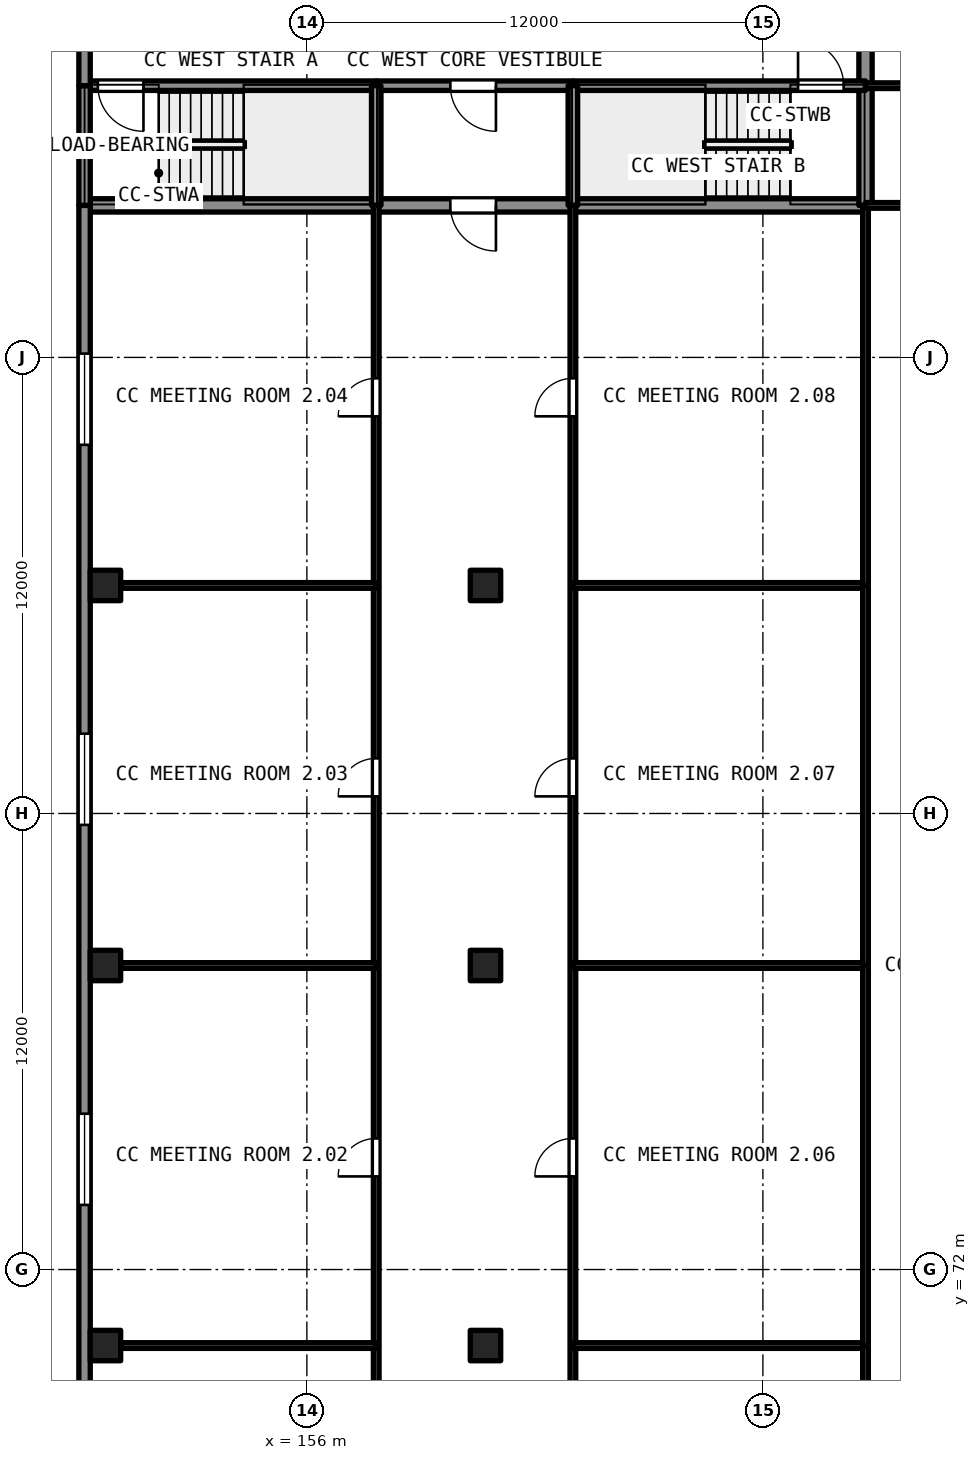
"""IFC4 building model, lengths in metres.
Left out: names, types, materials, properties, quantities, classifications, styles, units other than length and angle.
Written with IfcOpenShell. Run it as: python <this file> out.ifc"""

import sys

from ifc_helpers import new_model, si_unit, direction, frame, frame_2d, origin, origin_2d, place, context, subcontext, project, spatial, rectangle, extrude, element, fill, save


model = new_model("IFC4")
c1 = context("Model", 3, precision=1e-05, world=origin(), true_north=direction((0.0, 1.0)))
c2 = subcontext(c1, "Body", "Model", "MODEL_VIEW")
j1 = project(units=[si_unit("LENGTHUNIT", "METRE"), si_unit("PLANEANGLEUNIT", "RADIAN")], contexts=[c1])
p1 = place(None, origin())
s1 = spatial("IfcSite", under=j1, at=p1, CompositionType="ELEMENT")
p2 = place(p1, origin())
s2 = spatial("IfcBuilding", under=s1, at=p2, CompositionType="ELEMENT")
p3 = place(p2, frame((0.0, 0.0, 15.0)))
s3 = spatial("IfcBuildingStorey", under=s2, at=p3, CompositionType="ELEMENT", Elevation=15.0)
for number, where, z_axis, x_axis in (
    (1, (150.7, 70.0, 0.0), (0.0, 0.0, 1.0), (1.0, 0.0, 0.0)),
    (2, (150.7, 80.0, 0.0), (0.0, 0.0, 1.0), (1.0, 0.0, 0.0)),
    (3, (150.7, 90.0, 0.0), (0.0, 0.0, 1.0), (1.0, 0.0, 0.0)),
    (4, (160.7, 70.0, 0.0), (0.0, 0.0, 1.0), (1.0, 0.0, 0.0)),
    (5, (160.7, 80.0, 0.0), (0.0, 0.0, 1.0), (1.0, 0.0, 0.0)),
    (6, (160.7, 90.0, 0.0), (0.0, 0.0, 1.0), (1.0, 0.0, 0.0)),
):
    element("IfcColumn", number, at=place(p3, frame(where, z_axis=z_axis, x_axis=x_axis)), inside=s3, PredefinedType="COLUMN", context=c2, shape_type="SweptSolid", body=[
        extrude(rectangle(XDim=0.8, YDim=0.8, at=origin_2d()), origin(), (0.0, 0.0, 1.0), 5.4),
    ])
p4 = place(p3, frame((150.3, 100.0, 0.0), z_axis=(0.0, 0.0, 1.0), x_axis=(1.0, 0.0, 0.0)))
e7 = element("IfcWall", 7, at=p4, inside=s3, PredefinedType="SHEAR", context=c2, shape_type="SweptSolid", body=[
    extrude(rectangle(XDim=7.525, YDim=0.35, at=frame_2d((3.762, 0.0))), origin(), (0.0, 0.0, 1.0), 4.99),
])
p5 = place(p3, frame((163.0, 100.0, 0.0), z_axis=(0.0, 0.0, 1.0), x_axis=(-1.0, 0.0, 0.0)))
e8 = element("IfcWall", 8, at=p5, inside=s3, PredefinedType="SHEAR", context=c2, shape_type="SweptSolid", body=[
    extrude(rectangle(XDim=5.175, YDim=0.35, at=frame_2d((2.587, 0.0))), origin(), (0.0, 0.0, 1.0), 4.99),
])
p6 = place(p5, frame((2.025, 0.0, 0.0)))
e9 = element("IfcOpeningElement", 9, at=p6, cuts=e8, PredefinedType="OPENING", context=c2, shape_type="SweptSolid", body=[
    extrude(rectangle(XDim=1.2, YDim=2.1, at=frame_2d((0.6, 1.05))), frame((0.0, 0.186, 0.0), z_axis=(0.0, -1.0, 0.0), x_axis=(1.0, 0.0, 0.0)), (0.0, 0.0, 1.0), 0.371),
])
p7 = place(p3, frame((163.0, 100.0, 0.0), z_axis=(0.0, 0.0, 1.0), x_axis=(1.0, 0.0, 0.0)))
e10 = element("IfcWall", 10, at=p7, inside=s3, PredefinedType="SHEAR", context=c2, shape_type="SweptSolid", body=[
    extrude(rectangle(XDim=7.7, YDim=0.35, at=frame_2d((3.85, 0.0))), origin(), (0.0, 0.0, 1.0), 4.99),
])
p8 = place(p3, frame((170.7, 100.0, 0.0), z_axis=(0.0, 0.0, 1.0), x_axis=(0.0, 1.0, 0.0)))
e11 = element("IfcWall", 11, at=p8, inside=s3, PredefinedType="SHEAR", context=c2, shape_type="SweptSolid", body=[
    extrude(rectangle(XDim=3.15, YDim=0.35, at=frame_2d((1.575, 0.0))), origin(), (0.0, 0.0, 1.0), 4.99),
])
p9 = place(p3, frame((170.7, 103.15, 0.0), z_axis=(0.0, 0.0, 1.0), x_axis=(0.0, 1.0, 0.0)))
e12 = element("IfcWall", 12, at=p9, inside=s3, PredefinedType="SHEAR", context=c2, shape_type="SweptSolid", body=[
    extrude(rectangle(XDim=7.25, YDim=0.35, at=frame_2d((3.625, 0.0))), origin(), (0.0, 0.0, 1.0), 4.99),
])
p10 = place(p9, frame((1.2, 0.0, 0.0)))
e13 = element("IfcOpeningElement", 13, at=p10, cuts=e12, PredefinedType="OPENING", context=c2, shape_type="SweptSolid", body=[
    extrude(rectangle(XDim=1.8, YDim=2.1, at=frame_2d((0.9, 1.05))), frame((0.0, 0.186, 0.0), z_axis=(0.0, -1.0, 0.0), x_axis=(1.0, 0.0, 0.0)), (0.0, 0.0, 1.0), 0.371),
])
p11 = place(p3, frame((150.3, 103.15, 0.0), z_axis=(0.0, 0.0, 1.0), x_axis=(1.0, 0.0, 0.0)))
e14 = element("IfcWall", 14, at=p11, inside=s3, PredefinedType="SHEAR", context=c2, shape_type="SweptSolid", body=[
    extrude(rectangle(XDim=7.525, YDim=0.25, at=frame_2d((3.762, 0.0))), origin(), (0.0, 0.0, 1.0), 4.99),
])
p12 = place(p11, frame((0.2, 0.0, 0.0)))
e15 = element("IfcOpeningElement", 15, at=p12, cuts=e14, PredefinedType="OPENING", context=c2, shape_type="SweptSolid", body=[
    extrude(rectangle(XDim=1.2, YDim=2.1, at=frame_2d((0.6, 1.05))), frame((0.0, 0.135, 0.0), z_axis=(0.0, -1.0, 0.0), x_axis=(1.0, 0.0, 0.0)), (0.0, 0.0, 1.0), 0.271),
])
p13 = place(p3, frame((157.825, 103.15, 0.0), z_axis=(0.0, 0.0, 1.0), x_axis=(1.0, 0.0, 0.0)))
e16 = element("IfcWall", 16, at=p13, inside=s3, PredefinedType="SHEAR", context=c2, shape_type="SweptSolid", body=[
    extrude(rectangle(XDim=5.175, YDim=0.25, at=frame_2d((2.587, 0.0))), origin(), (0.0, 0.0, 1.0), 4.99),
])
p14 = place(p13, frame((1.95, 0.0, 0.0)))
e17 = element("IfcOpeningElement", 17, at=p14, cuts=e16, PredefinedType="OPENING", context=c2, shape_type="SweptSolid", body=[
    extrude(rectangle(XDim=1.2, YDim=2.1, at=frame_2d((0.6, 1.05))), frame((0.0, 0.135, 0.0), z_axis=(0.0, -1.0, 0.0), x_axis=(1.0, 0.0, 0.0)), (0.0, 0.0, 1.0), 0.271),
])
p15 = place(p3, frame((163.0, 103.15, 0.0), z_axis=(0.0, 0.0, 1.0), x_axis=(1.0, 0.0, 0.0)))
e18 = element("IfcWall", 18, at=p15, inside=s3, PredefinedType="SHEAR", context=c2, shape_type="SweptSolid", body=[
    extrude(rectangle(XDim=7.7, YDim=0.25, at=frame_2d((3.85, 0.0))), origin(), (0.0, 0.0, 1.0), 4.99),
])
p16 = place(p15, frame((5.925, 0.0, 0.0)))
e19 = element("IfcOpeningElement", 19, at=p16, cuts=e18, PredefinedType="OPENING", context=c2, shape_type="SweptSolid", body=[
    extrude(rectangle(XDim=1.2, YDim=2.1, at=frame_2d((0.6, 1.05))), frame((0.0, 0.135, 0.0), z_axis=(0.0, -1.0, 0.0), x_axis=(1.0, 0.0, 0.0)), (0.0, 0.0, 1.0), 0.271),
])
for number, where, z_axis, x_axis in (
    (20, (157.825, 100.0, 0.0), (0.0, 0.0, 1.0), (0.0, 1.0, 0.0)),
    (21, (163.0, 100.0, 0.0), (0.0, 0.0, 1.0), (0.0, 1.0, 0.0)),
):
    element("IfcWall", number, at=place(p3, frame(where, z_axis=z_axis, x_axis=x_axis)), inside=s3, PredefinedType="SHEAR", context=c2, shape_type="SweptSolid", body=[
        extrude(rectangle(XDim=3.15, YDim=0.25, at=frame_2d((1.575, 0.0))), origin(), (0.0, 0.0, 1.0), 4.99),
    ])
p17 = place(p3, frame((150.15, 49.45, 0.0), z_axis=(0.0, 0.0, 1.0), x_axis=(0.0, 1.0, 0.0)))
e22 = element("IfcWall", 22, at=p17, inside=s3, PredefinedType="SOLIDWALL", context=c2, shape_type="SweptSolid", body=[
    extrude(rectangle(XDim=50.55, YDim=0.3, at=frame_2d((25.275, 0.0))), origin(), (0.0, 0.0, 1.0), 4.99),
])
p18 = place(p17, frame((14.25, 0.0, 0.9)))
e23 = element("IfcOpeningElement", 23, at=p18, cuts=e22, PredefinedType="OPENING", context=c2, shape_type="SweptSolid", body=[
    extrude(rectangle(XDim=2.4, YDim=1.8, at=frame_2d((1.2, 0.9))), frame((0.0, 0.161, 0.0), z_axis=(0.0, -1.0, 0.0), x_axis=(1.0, 0.0, 0.0)), (0.0, 0.0, 1.0), 0.321),
])
p19 = place(p17, frame((24.25, 0.0, 0.9)))
e24 = element("IfcOpeningElement", 24, at=p19, cuts=e22, PredefinedType="OPENING", context=c2, shape_type="SweptSolid", body=[
    extrude(rectangle(XDim=2.4, YDim=1.8, at=frame_2d((1.2, 0.9))), frame((0.0, 0.161, 0.0), z_axis=(0.0, -1.0, 0.0), x_axis=(1.0, 0.0, 0.0)), (0.0, 0.0, 1.0), 0.321),
])
p20 = place(p17, frame((34.25, 0.0, 0.9)))
e25 = element("IfcOpeningElement", 25, at=p20, cuts=e22, PredefinedType="OPENING", context=c2, shape_type="SweptSolid", body=[
    extrude(rectangle(XDim=2.4, YDim=1.8, at=frame_2d((1.2, 0.9))), frame((0.0, 0.161, 0.0), z_axis=(0.0, -1.0, 0.0), x_axis=(1.0, 0.0, 0.0)), (0.0, 0.0, 1.0), 0.321),
])
p21 = place(p17, frame((44.25, 0.0, 0.9)))
e26 = element("IfcOpeningElement", 26, at=p21, cuts=e22, PredefinedType="OPENING", context=c2, shape_type="SweptSolid", body=[
    extrude(rectangle(XDim=2.4, YDim=1.8, at=frame_2d((1.2, 0.9))), frame((0.0, 0.161, 0.0), z_axis=(0.0, -1.0, 0.0), x_axis=(1.0, 0.0, 0.0)), (0.0, 0.0, 1.0), 0.321),
])
p22 = place(p3, frame((150.15, 100.0, 0.0), z_axis=(0.0, 0.0, 1.0), x_axis=(0.0, 1.0, 0.0)))
e27 = element("IfcWall", 27, at=p22, inside=s3, PredefinedType="SOLIDWALL", context=c2, shape_type="SweptSolid", body=[
    extrude(rectangle(XDim=3.15, YDim=0.3, at=frame_2d((1.575, 0.0))), origin(), (0.0, 0.0, 1.0), 4.99),
])
p23 = place(p3, frame((150.15, 103.15, 0.0), z_axis=(0.0, 0.0, 1.0), x_axis=(0.0, 1.0, 0.0)))
e28 = element("IfcWall", 28, at=p23, inside=s3, PredefinedType="SOLIDWALL", context=c2, shape_type="SweptSolid", body=[
    extrude(rectangle(XDim=4.225, YDim=0.3, at=frame_2d((2.113, 0.0))), origin(), (0.0, 0.0, 1.0), 4.99),
])
p24 = place(p3, frame((157.825, 100.0, 0.0), z_axis=(0.0, 0.0, 1.0), x_axis=(0.0, -1.0, 0.0)))
e29 = element("IfcWall", 29, at=p24, inside=s3, PredefinedType="PARTITIONING", context=c2, shape_type="SweptSolid", body=[
    extrude(rectangle(XDim=40.0, YDim=0.15, at=frame_2d((20.0, 0.0))), origin(), (0.0, 0.0, 1.0), 4.99),
])
p25 = place(p24, frame((34.55, 0.0, 0.0)))
e30 = element("IfcOpeningElement", 30, at=p25, cuts=e29, PredefinedType="OPENING", context=c2, shape_type="SweptSolid", body=[
    extrude(rectangle(XDim=1.0, YDim=2.1, at=frame_2d((0.5, 1.05))), frame((0.0, 0.085, 0.0), z_axis=(0.0, -1.0, 0.0), x_axis=(1.0, 0.0, 0.0)), (0.0, 0.0, 1.0), 0.171),
])
p26 = place(p24, frame((24.55, 0.0, 0.0)))
e31 = element("IfcOpeningElement", 31, at=p26, cuts=e29, PredefinedType="OPENING", context=c2, shape_type="SweptSolid", body=[
    extrude(rectangle(XDim=1.0, YDim=2.1, at=frame_2d((0.5, 1.05))), frame((0.0, 0.085, 0.0), z_axis=(0.0, -1.0, 0.0), x_axis=(1.0, 0.0, 0.0)), (0.0, 0.0, 1.0), 0.171),
])
p27 = place(p24, frame((14.55, 0.0, 0.0)))
e32 = element("IfcOpeningElement", 32, at=p27, cuts=e29, PredefinedType="OPENING", context=c2, shape_type="SweptSolid", body=[
    extrude(rectangle(XDim=1.0, YDim=2.1, at=frame_2d((0.5, 1.05))), frame((0.0, 0.085, 0.0), z_axis=(0.0, -1.0, 0.0), x_axis=(1.0, 0.0, 0.0)), (0.0, 0.0, 1.0), 0.171),
])
p28 = place(p24, frame((4.55, 0.0, 0.0)))
e33 = element("IfcOpeningElement", 33, at=p28, cuts=e29, PredefinedType="OPENING", context=c2, shape_type="SweptSolid", body=[
    extrude(rectangle(XDim=1.0, YDim=2.1, at=frame_2d((0.5, 1.05))), frame((0.0, 0.085, 0.0), z_axis=(0.0, -1.0, 0.0), x_axis=(1.0, 0.0, 0.0)), (0.0, 0.0, 1.0), 0.171),
])
p29 = place(p3, frame((163.0, 60.0, 0.0), z_axis=(0.0, 0.0, 1.0), x_axis=(0.0, 1.0, 0.0)))
e34 = element("IfcWall", 34, at=p29, inside=s3, PredefinedType="PARTITIONING", context=c2, shape_type="SweptSolid", body=[
    extrude(rectangle(XDim=40.0, YDim=0.15, at=frame_2d((20.0, 0.0))), origin(), (0.0, 0.0, 1.0), 4.99),
])
p30 = place(p29, frame((4.45, 0.0, 0.0)))
e35 = element("IfcOpeningElement", 35, at=p30, cuts=e34, PredefinedType="OPENING", context=c2, shape_type="SweptSolid", body=[
    extrude(rectangle(XDim=1.0, YDim=2.1, at=frame_2d((0.5, 1.05))), frame((0.0, 0.085, 0.0), z_axis=(0.0, -1.0, 0.0), x_axis=(1.0, 0.0, 0.0)), (0.0, 0.0, 1.0), 0.171),
])
p31 = place(p29, frame((14.45, 0.0, 0.0)))
e36 = element("IfcOpeningElement", 36, at=p31, cuts=e34, PredefinedType="OPENING", context=c2, shape_type="SweptSolid", body=[
    extrude(rectangle(XDim=1.0, YDim=2.1, at=frame_2d((0.5, 1.05))), frame((0.0, 0.085, 0.0), z_axis=(0.0, -1.0, 0.0), x_axis=(1.0, 0.0, 0.0)), (0.0, 0.0, 1.0), 0.171),
])
p32 = place(p29, frame((24.45, 0.0, 0.0)))
e37 = element("IfcOpeningElement", 37, at=p32, cuts=e34, PredefinedType="OPENING", context=c2, shape_type="SweptSolid", body=[
    extrude(rectangle(XDim=1.0, YDim=2.1, at=frame_2d((0.5, 1.05))), frame((0.0, 0.085, 0.0), z_axis=(0.0, -1.0, 0.0), x_axis=(1.0, 0.0, 0.0)), (0.0, 0.0, 1.0), 0.171),
])
p33 = place(p29, frame((34.45, 0.0, 0.0)))
e38 = element("IfcOpeningElement", 38, at=p33, cuts=e34, PredefinedType="OPENING", context=c2, shape_type="SweptSolid", body=[
    extrude(rectangle(XDim=1.0, YDim=2.1, at=frame_2d((0.5, 1.05))), frame((0.0, 0.085, 0.0), z_axis=(0.0, -1.0, 0.0), x_axis=(1.0, 0.0, 0.0)), (0.0, 0.0, 1.0), 0.171),
])
p34 = place(p3, frame((151.1, 70.0, 0.0), z_axis=(0.0, 0.0, 1.0), x_axis=(1.0, 0.0, 0.0)))
e39 = element("IfcWall", 39, at=p34, inside=s3, PredefinedType="PARTITIONING", context=c2, shape_type="SweptSolid", body=[
    extrude(rectangle(XDim=6.725, YDim=0.15, at=frame_2d((3.362, 0.0))), origin(), (0.0, 0.0, 1.0), 4.99),
])
p35 = place(p3, frame((163.0, 70.0, 0.0), z_axis=(0.0, 0.0, 1.0), x_axis=(1.0, 0.0, 0.0)))
e40 = element("IfcWall", 40, at=p35, inside=s3, PredefinedType="PARTITIONING", context=c2, shape_type="SweptSolid", body=[
    extrude(rectangle(XDim=7.7, YDim=0.15, at=frame_2d((3.85, 0.0))), origin(), (0.0, 0.0, 1.0), 4.99),
])
p36 = place(p3, frame((170.7, 60.4, 0.0), z_axis=(0.0, 0.0, 1.0), x_axis=(0.0, 1.0, 0.0)))
e41 = element("IfcWall", 41, at=p36, inside=s3, PredefinedType="PARTITIONING", context=c2, shape_type="SweptSolid", body=[
    extrude(rectangle(XDim=9.6, YDim=0.15, at=frame_2d((4.8, 0.0))), origin(), (0.0, 0.0, 1.0), 4.99),
])
p37 = place(p3, frame((151.1, 80.0, 0.0), z_axis=(0.0, 0.0, 1.0), x_axis=(1.0, 0.0, 0.0)))
e42 = element("IfcWall", 42, at=p37, inside=s3, PredefinedType="PARTITIONING", context=c2, shape_type="SweptSolid", body=[
    extrude(rectangle(XDim=6.725, YDim=0.15, at=frame_2d((3.362, 0.0))), origin(), (0.0, 0.0, 1.0), 4.99),
])
p38 = place(p3, frame((163.0, 80.0, 0.0), z_axis=(0.0, 0.0, 1.0), x_axis=(1.0, 0.0, 0.0)))
e43 = element("IfcWall", 43, at=p38, inside=s3, PredefinedType="PARTITIONING", context=c2, shape_type="SweptSolid", body=[
    extrude(rectangle(XDim=7.7, YDim=0.15, at=frame_2d((3.85, 0.0))), origin(), (0.0, 0.0, 1.0), 4.99),
])
p39 = place(p3, frame((170.7, 70.0, 0.0), z_axis=(0.0, 0.0, 1.0), x_axis=(0.0, 1.0, 0.0)))
e44 = element("IfcWall", 44, at=p39, inside=s3, PredefinedType="PARTITIONING", context=c2, shape_type="SweptSolid", body=[
    extrude(rectangle(XDim=10.0, YDim=0.15, at=frame_2d((5.0, 0.0))), origin(), (0.0, 0.0, 1.0), 4.99),
])
p40 = place(p3, frame((151.1, 90.0, 0.0), z_axis=(0.0, 0.0, 1.0), x_axis=(1.0, 0.0, 0.0)))
e45 = element("IfcWall", 45, at=p40, inside=s3, PredefinedType="PARTITIONING", context=c2, shape_type="SweptSolid", body=[
    extrude(rectangle(XDim=6.725, YDim=0.15, at=frame_2d((3.362, 0.0))), origin(), (0.0, 0.0, 1.0), 4.99),
])
p41 = place(p3, frame((163.0, 90.0, 0.0), z_axis=(0.0, 0.0, 1.0), x_axis=(1.0, 0.0, 0.0)))
e46 = element("IfcWall", 46, at=p41, inside=s3, PredefinedType="PARTITIONING", context=c2, shape_type="SweptSolid", body=[
    extrude(rectangle(XDim=7.7, YDim=0.15, at=frame_2d((3.85, 0.0))), origin(), (0.0, 0.0, 1.0), 4.99),
])
for number, where, z_axis, x_axis in (
    (47, (170.7, 80.0, 0.0), (0.0, 0.0, 1.0), (0.0, 1.0, 0.0)),
    (48, (170.7, 90.0, 0.0), (0.0, 0.0, 1.0), (0.0, 1.0, 0.0)),
):
    element("IfcWall", number, at=place(p3, frame(where, z_axis=z_axis, x_axis=x_axis)), inside=s3, PredefinedType="PARTITIONING", context=c2, shape_type="SweptSolid", body=[
        extrude(rectangle(XDim=10.0, YDim=0.15, at=frame_2d((5.0, 0.0))), origin(), (0.0, 0.0, 1.0), 4.99),
    ])
p42 = place(p3, frame((170.7, 100.0, 0.0), z_axis=(0.0, 0.0, 1.0), x_axis=(1.0, 0.0, 0.0)))
e49 = element("IfcWall", 49, at=p42, inside=s3, PredefinedType="PARTITIONING", context=c2, shape_type="SweptSolid", body=[
    extrude(rectangle(XDim=9.6, YDim=0.15, at=frame_2d((4.8, 0.0))), origin(), (0.0, 0.0, 1.0), 4.99),
])
p43 = place(p3, frame((170.7, 103.15, 0.0), z_axis=(0.0, 0.0, 1.0), x_axis=(1.0, 0.0, 0.0)))
e50 = element("IfcWall", 50, at=p43, inside=s3, PredefinedType="PARTITIONING", context=c2, shape_type="SweptSolid", body=[
    extrude(rectangle(XDim=10.85, YDim=0.15, at=frame_2d((5.425, 0.0))), origin(), (0.0, 0.0, 1.0), 4.99),
])
p44 = place(p43, frame((4.95, 0.0, 0.0)))
e51 = element("IfcOpeningElement", 51, at=p44, cuts=e50, PredefinedType="OPENING", context=c2, shape_type="SweptSolid", body=[
    extrude(rectangle(XDim=1.0, YDim=2.1, at=frame_2d((0.5, 1.05))), frame((0.0, 0.085, 0.0), z_axis=(0.0, -1.0, 0.0), x_axis=(1.0, 0.0, 0.0)), (0.0, 0.0, 1.0), 0.171),
])
p45 = place(p6, origin())
e52 = element("IfcDoor", 52, at=p45, inside=s3, OperationType="SINGLE_SWING_LEFT", PredefinedType="DOOR", context=c2, shape_type="SweptSolid", body=[
    extrude(rectangle(XDim=1.2, YDim=2.1, at=frame_2d((0.6, 1.05))), frame((0.0, 0.025, 0.0), z_axis=(0.0, -1.0, 0.0), x_axis=(1.0, 0.0, 0.0)), (0.0, 0.0, 1.0), 0.05),
])
fill(e9, e52)
p46 = place(p26, origin())
e53 = element("IfcDoor", 53, at=p46, inside=s3, OperationType="SINGLE_SWING_RIGHT", PredefinedType="DOOR", context=c2, shape_type="SweptSolid", body=[
    extrude(rectangle(XDim=1.0, YDim=2.1, at=frame_2d((0.5, 1.05))), frame((0.0, 0.025, 0.0), z_axis=(0.0, -1.0, 0.0), x_axis=(1.0, 0.0, 0.0)), (0.0, 0.0, 1.0), 0.05),
])
fill(e31, e53)
p47 = place(p31, origin())
e54 = element("IfcDoor", 54, at=p47, inside=s3, OperationType="SINGLE_SWING_LEFT", PredefinedType="DOOR", context=c2, shape_type="SweptSolid", body=[
    extrude(rectangle(XDim=1.0, YDim=2.1, at=frame_2d((0.5, 1.05))), frame((0.0, 0.025, 0.0), z_axis=(0.0, -1.0, 0.0), x_axis=(1.0, 0.0, 0.0)), (0.0, 0.0, 1.0), 0.05),
])
fill(e36, e54)
p48 = place(p27, origin())
e55 = element("IfcDoor", 55, at=p48, inside=s3, OperationType="SINGLE_SWING_RIGHT", PredefinedType="DOOR", context=c2, shape_type="SweptSolid", body=[
    extrude(rectangle(XDim=1.0, YDim=2.1, at=frame_2d((0.5, 1.05))), frame((0.0, 0.025, 0.0), z_axis=(0.0, -1.0, 0.0), x_axis=(1.0, 0.0, 0.0)), (0.0, 0.0, 1.0), 0.05),
])
fill(e32, e55)
p49 = place(p32, origin())
e56 = element("IfcDoor", 56, at=p49, inside=s3, OperationType="SINGLE_SWING_LEFT", PredefinedType="DOOR", context=c2, shape_type="SweptSolid", body=[
    extrude(rectangle(XDim=1.0, YDim=2.1, at=frame_2d((0.5, 1.05))), frame((0.0, 0.025, 0.0), z_axis=(0.0, -1.0, 0.0), x_axis=(1.0, 0.0, 0.0)), (0.0, 0.0, 1.0), 0.05),
])
fill(e37, e56)
p50 = place(p28, origin())
e57 = element("IfcDoor", 57, at=p50, inside=s3, OperationType="SINGLE_SWING_RIGHT", PredefinedType="DOOR", context=c2, shape_type="SweptSolid", body=[
    extrude(rectangle(XDim=1.0, YDim=2.1, at=frame_2d((0.5, 1.05))), frame((0.0, 0.025, 0.0), z_axis=(0.0, -1.0, 0.0), x_axis=(1.0, 0.0, 0.0)), (0.0, 0.0, 1.0), 0.05),
])
fill(e33, e57)
p51 = place(p33, origin())
e58 = element("IfcDoor", 58, at=p51, inside=s3, OperationType="SINGLE_SWING_LEFT", PredefinedType="DOOR", context=c2, shape_type="SweptSolid", body=[
    extrude(rectangle(XDim=1.0, YDim=2.1, at=frame_2d((0.5, 1.05))), frame((0.0, 0.025, 0.0), z_axis=(0.0, -1.0, 0.0), x_axis=(1.0, 0.0, 0.0)), (0.0, 0.0, 1.0), 0.05),
])
fill(e38, e58)
p52 = place(p12, origin())
e59 = element("IfcDoor", 59, at=p52, inside=s3, OperationType="SINGLE_SWING_RIGHT", PredefinedType="DOOR", context=c2, shape_type="SweptSolid", body=[
    extrude(rectangle(XDim=1.2, YDim=2.1, at=frame_2d((0.6, 1.05))), frame((0.0, 0.025, 0.0), z_axis=(0.0, -1.0, 0.0), x_axis=(1.0, 0.0, 0.0)), (0.0, 0.0, 1.0), 0.05),
])
fill(e15, e59)
p53 = place(p16, origin())
e60 = element("IfcDoor", 60, at=p53, inside=s3, OperationType="SINGLE_SWING_LEFT", PredefinedType="DOOR", context=c2, shape_type="SweptSolid", body=[
    extrude(rectangle(XDim=1.2, YDim=2.1, at=frame_2d((0.6, 1.05))), frame((0.0, 0.025, 0.0), z_axis=(0.0, -1.0, 0.0), x_axis=(1.0, 0.0, 0.0)), (0.0, 0.0, 1.0), 0.05),
])
fill(e19, e60)
p54 = place(p14, origin())
e61 = element("IfcDoor", 61, at=p54, inside=s3, OperationType="SINGLE_SWING_RIGHT", PredefinedType="DOOR", context=c2, shape_type="SweptSolid", body=[
    extrude(rectangle(XDim=1.2, YDim=2.1, at=frame_2d((0.6, 1.05))), frame((0.0, 0.025, 0.0), z_axis=(0.0, -1.0, 0.0), x_axis=(1.0, 0.0, 0.0)), (0.0, 0.0, 1.0), 0.05),
])
fill(e17, e61)
p55 = place(p19, origin())
e62 = element("IfcWindow", 62, at=p55, inside=s3, PartitioningType="DOUBLE_PANEL_VERTICAL", PredefinedType="WINDOW", context=c2, shape_type="SweptSolid", body=[
    extrude(rectangle(XDim=2.4, YDim=1.8, at=frame_2d((1.2, 0.9))), frame((0.0, 0.03, 0.0), z_axis=(0.0, -1.0, 0.0), x_axis=(1.0, 0.0, 0.0)), (0.0, 0.0, 1.0), 0.06),
])
fill(e24, e62)
p56 = place(p20, origin())
e63 = element("IfcWindow", 63, at=p56, inside=s3, PartitioningType="DOUBLE_PANEL_VERTICAL", PredefinedType="WINDOW", context=c2, shape_type="SweptSolid", body=[
    extrude(rectangle(XDim=2.4, YDim=1.8, at=frame_2d((1.2, 0.9))), frame((0.0, 0.03, 0.0), z_axis=(0.0, -1.0, 0.0), x_axis=(1.0, 0.0, 0.0)), (0.0, 0.0, 1.0), 0.06),
])
fill(e25, e63)
p57 = place(p21, origin())
e64 = element("IfcWindow", 64, at=p57, inside=s3, PartitioningType="DOUBLE_PANEL_VERTICAL", PredefinedType="WINDOW", context=c2, shape_type="SweptSolid", body=[
    extrude(rectangle(XDim=2.4, YDim=1.8, at=frame_2d((1.2, 0.9))), frame((0.0, 0.03, 0.0), z_axis=(0.0, -1.0, 0.0), x_axis=(1.0, 0.0, 0.0)), (0.0, 0.0, 1.0), 0.06),
])
fill(e26, e64)
save(model, sys.argv[1])
